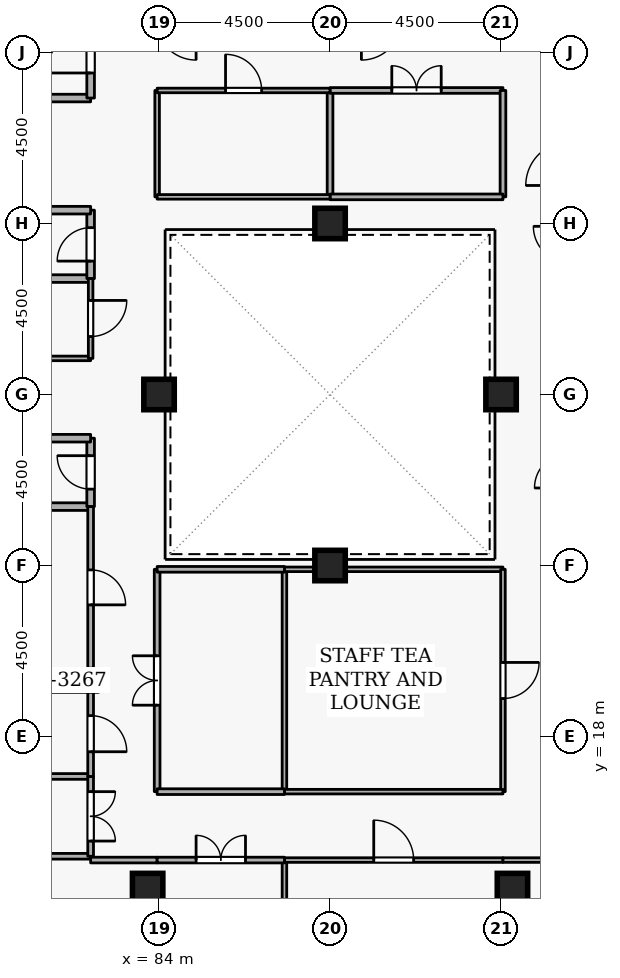
"""IFC4 building model, lengths in metres.
Left out: names, types, materials, properties, quantities, classifications, styles, units other than length and angle.
Written with IfcOpenShell. Run it as: python <this file> out.ifc"""

import sys

from ifc_helpers import new_model, si_unit, direction, frame, frame_2d, origin, origin_2d, place, context, subcontext, project, spatial, rectangle, extrude, element, fill, save


model = new_model("IFC4")
c1 = context("Model", 3, precision=1e-05, world=origin(), true_north=direction((0.0, 1.0)))
c2 = subcontext(c1, "Body", "Model", "MODEL_VIEW")
j1 = project(units=[si_unit("LENGTHUNIT", "METRE"), si_unit("PLANEANGLEUNIT", "RADIAN")], contexts=[c1])
p1 = place(None, origin())
s1 = spatial("IfcSite", under=j1, at=p1, CompositionType="ELEMENT")
p2 = place(p1, origin())
s2 = spatial("IfcBuilding", under=s1, at=p2, CompositionType="ELEMENT")
p3 = place(p2, frame((0.0, 0.0, 265.5)))
s3 = spatial("IfcBuildingStorey", under=s2, at=p3, CompositionType="ELEMENT", Elevation=265.5)
p4 = place(p3, frame((76.6, 19.45, 0.0), z_axis=(0.0, 0.0, 1.0), x_axis=(1.0, 0.0, 0.0)))
e1 = element("IfcWall", 1, at=p4, inside=s3, PredefinedType="SHEAR", context=c2, shape_type="SweptSolid", body=[
    extrude(rectangle(XDim=5.8, YDim=0.5, at=frame_2d((2.9, 0.0))), origin(), (0.0, 0.0, 1.0), 3.6),
])
for number, where, z_axis, x_axis in (
    (2, (93.3, 14.0, 0.0), (0.0, 0.0, 1.0), (1.0, 0.0, 0.0)),
    (3, (83.7, 14.0, 0.0), (0.0, 0.0, 1.0), (1.0, 0.0, 0.0)),
    (4, (93.0, 27.0, 0.0), (0.0, 0.0, 1.0), (1.0, 0.0, 0.0)),
    (5, (84.0, 27.0, 0.0), (0.0, 0.0, 1.0), (1.0, 0.0, 0.0)),
    (6, (88.5, 22.5, 0.0), (0.0, 0.0, 1.0), (1.0, 0.0, 0.0)),
    (7, (88.5, 31.5, 0.0), (0.0, 0.0, 1.0), (1.0, 0.0, 0.0)),
):
    element("IfcColumn", number, at=place(p3, frame(where, z_axis=z_axis, x_axis=x_axis)), inside=s3, PredefinedType="COLUMN", context=c2, shape_type="SweptSolid", body=[
        extrude(rectangle(XDim=0.8, YDim=0.8, at=origin_2d()), origin(), (0.0, 0.0, 1.0), 3.6),
    ])
p5 = place(p3, frame((79.9, 34.8, 0.0), z_axis=(0.0, 0.0, 1.0), x_axis=(1.0, 0.0, 0.0)))
e8 = element("IfcWall", 8, at=p5, inside=s3, PredefinedType="STANDARD", context=c2, shape_type="SweptSolid", body=[
    extrude(rectangle(XDim=2.3, YDim=0.2, at=frame_2d((1.15, 0.0))), origin(), (0.0, 0.0, 1.0), 2.545),
])
p6 = place(p3, frame((82.2, 34.8, 0.0), z_axis=(0.0, 0.0, 1.0), x_axis=(0.0, 1.0, 0.0)))
e9 = element("IfcWall", 9, at=p6, inside=s3, PredefinedType="STANDARD", context=c2, shape_type="SweptSolid", body=[
    extrude(rectangle(XDim=2.5, YDim=0.2, at=frame_2d((1.25, 0.0))), origin(), (0.0, 0.0, 1.0), 3.34),
])
p7 = place(p6, frame((0.66, 0.0, 0.0)))
e10 = element("IfcOpeningElement", 10, at=p7, cuts=e9, PredefinedType="OPENING", context=c2, shape_type="SweptSolid", body=[
    extrude(rectangle(XDim=1.15, YDim=2.1, at=frame_2d((0.575, 1.05))), frame((0.0, 0.11, 0.0), z_axis=(0.0, -1.0, 0.0), x_axis=(1.0, 0.0, 0.0)), (0.0, 0.0, 1.0), 0.22),
])
p8 = place(p3, frame((80.15, 24.05, 0.0), z_axis=(0.0, 0.0, 1.0), x_axis=(1.0, 0.0, 0.0)))
e11 = element("IfcWall", 11, at=p8, inside=s3, PredefinedType="STANDARD", context=c2, shape_type="SweptSolid", body=[
    extrude(rectangle(XDim=2.05, YDim=0.2, at=frame_2d((1.025, 0.0))), origin(), (0.0, 0.0, 1.0), 3.34),
])
p9 = place(p3, frame((82.2, 24.05, 0.0), z_axis=(0.0, 0.0, 1.0), x_axis=(0.0, 1.0, 0.0)))
e12 = element("IfcWall", 12, at=p9, inside=s3, PredefinedType="STANDARD", context=c2, shape_type="SweptSolid", body=[
    extrude(rectangle(XDim=1.8, YDim=0.2, at=frame_2d((0.9, 0.0))), origin(), (0.0, 0.0, 1.0), 3.34),
])
p10 = place(p9, frame((0.46, 0.0, 0.0)))
e13 = element("IfcOpeningElement", 13, at=p10, cuts=e12, PredefinedType="OPENING", context=c2, shape_type="SweptSolid", body=[
    extrude(rectangle(XDim=0.88, YDim=2.04, at=frame_2d((0.44, 1.02))), frame((0.0, 0.11, 0.0), z_axis=(0.0, -1.0, 0.0), x_axis=(1.0, 0.0, 0.0)), (0.0, 0.0, 1.0), 0.22),
])
for number, where, z_axis, x_axis in (
    (14, (82.2, 25.85, 0.0), (0.0, 0.0, 1.0), (-1.0, 0.0, 0.0)),
    (15, (80.15, 30.05, 0.0), (0.0, 0.0, 1.0), (1.0, 0.0, 0.0)),
):
    element("IfcWall", number, at=place(p3, frame(where, z_axis=z_axis, x_axis=x_axis)), inside=s3, PredefinedType="STANDARD", context=c2, shape_type="SweptSolid", body=[
        extrude(rectangle(XDim=2.05, YDim=0.2, at=frame_2d((1.025, 0.0))), origin(), (0.0, 0.0, 1.0), 3.34),
    ])
p11 = place(p3, frame((82.2, 30.05, 0.0), z_axis=(0.0, 0.0, 1.0), x_axis=(0.0, 1.0, 0.0)))
e16 = element("IfcWall", 16, at=p11, inside=s3, PredefinedType="STANDARD", context=c2, shape_type="SweptSolid", body=[
    extrude(rectangle(XDim=1.8, YDim=0.2, at=frame_2d((0.9, 0.0))), origin(), (0.0, 0.0, 1.0), 3.34),
])
p12 = place(p11, frame((0.46, 0.0, 0.0)))
e17 = element("IfcOpeningElement", 17, at=p12, cuts=e16, PredefinedType="OPENING", context=c2, shape_type="SweptSolid", body=[
    extrude(rectangle(XDim=0.88, YDim=2.04, at=frame_2d((0.44, 1.02))), frame((0.0, 0.11, 0.0), z_axis=(0.0, -1.0, 0.0), x_axis=(1.0, 0.0, 0.0)), (0.0, 0.0, 1.0), 0.22),
])
p13 = place(p3, frame((82.2, 31.85, 0.0), z_axis=(0.0, 0.0, 1.0), x_axis=(-1.0, 0.0, 0.0)))
e18 = element("IfcWall", 18, at=p13, inside=s3, PredefinedType="STANDARD", context=c2, shape_type="SweptSolid", body=[
    extrude(rectangle(XDim=2.05, YDim=0.2, at=frame_2d((1.025, 0.0))), origin(), (0.0, 0.0, 1.0), 3.34),
])
p14 = place(p3, frame((82.2, 24.05, 0.0), z_axis=(0.0, 0.0, 1.0), x_axis=(0.0, -1.0, 0.0)))
e19 = element("IfcWall", 19, at=p14, inside=s3, PredefinedType="PARTITIONING", context=c2, shape_type="SweptSolid", body=[
    extrude(rectangle(XDim=4.25, YDim=0.15, at=frame_2d((2.125, 0.0))), origin(), (0.0, 0.0, 1.0), 3.34),
])
p15 = place(p14, frame((1.665, 0.0, 0.0)))
e20 = element("IfcOpeningElement", 20, at=p15, cuts=e19, PredefinedType="OPENING", context=c2, shape_type="SweptSolid", body=[
    extrude(rectangle(XDim=0.92, YDim=2.08, at=frame_2d((0.46, 1.04))), frame((0.0, 0.085, 0.0), z_axis=(0.0, -1.0, 0.0), x_axis=(1.0, 0.0, 0.0)), (0.0, 0.0, 1.0), 0.17),
])
p16 = place(p3, frame((82.2, 27.95, 0.0), z_axis=(0.0, 0.0, 1.0), x_axis=(-1.0, 0.0, 0.0)))
e21 = element("IfcWall", 21, at=p16, inside=s3, PredefinedType="PARTITIONING", context=c2, shape_type="SweptSolid", body=[
    extrude(rectangle(XDim=2.05, YDim=0.12, at=frame_2d((1.025, 0.0))), origin(), (0.0, 0.0, 1.0), 3.34),
])
p17 = place(p3, frame((82.2, 30.05, 0.0), z_axis=(0.0, 0.0, 1.0), x_axis=(0.0, -1.0, 0.0)))
e22 = element("IfcWall", 22, at=p17, inside=s3, PredefinedType="PARTITIONING", context=c2, shape_type="SweptSolid", body=[
    extrude(rectangle(XDim=2.1, YDim=0.12, at=frame_2d((1.05, 0.0))), origin(), (0.0, 0.0, 1.0), 3.34),
])
p18 = place(p17, frame((0.575, 0.0, 0.0)))
e23 = element("IfcOpeningElement", 23, at=p18, cuts=e22, PredefinedType="OPENING", context=c2, shape_type="SweptSolid", body=[
    extrude(rectangle(XDim=0.95, YDim=2.1, at=frame_2d((0.475, 1.05))), frame((0.0, 0.07, 0.0), z_axis=(0.0, -1.0, 0.0), x_axis=(1.0, 0.0, 0.0)), (0.0, 0.0, 1.0), 0.14),
])
for number, where, z_axis, x_axis in (
    (24, (82.2, 14.85, 0.0), (0.0, 0.0, 1.0), (-1.0, 0.0, 0.0)),
    (25, (70.78, 16.95, 0.0), (0.0, 0.0, 1.0), (1.0, 0.0, 0.0)),
):
    element("IfcWall", number, at=place(p3, frame(where, z_axis=z_axis, x_axis=x_axis)), inside=s3, PredefinedType="PARTITIONING", context=c2, shape_type="SweptSolid", body=[
        extrude(rectangle(XDim=11.42, YDim=0.15, at=frame_2d((5.71, 0.0))), origin(), (0.0, 0.0, 1.0), 3.34),
    ])
p19 = place(p3, frame((82.2, 16.95, 0.0), z_axis=(0.0, 0.0, 1.0), x_axis=(0.0, -1.0, 0.0)))
e26 = element("IfcWall", 26, at=p19, inside=s3, PredefinedType="PARTITIONING", context=c2, shape_type="SweptSolid", body=[
    extrude(rectangle(XDim=2.1, YDim=0.15, at=frame_2d((1.05, 0.0))), origin(), (0.0, 0.0, 1.0), 3.34),
])
p20 = place(p19, frame((0.4, 0.0, 0.0)))
e27 = element("IfcOpeningElement", 27, at=p20, cuts=e26, PredefinedType="OPENING", context=c2, shape_type="SweptSolid", body=[
    extrude(rectangle(XDim=1.3, YDim=2.12, at=frame_2d((0.65, 1.06))), frame((0.0, 0.085, 0.0), z_axis=(0.0, -1.0, 0.0), x_axis=(1.0, 0.0, 0.0)), (0.0, 0.0, 1.0), 0.17),
])
p21 = place(p3, frame((82.2, 19.2, 0.0), z_axis=(0.0, 0.0, 1.0), x_axis=(0.0, -1.0, 0.0)))
e28 = element("IfcWall", 28, at=p21, inside=s3, PredefinedType="PARTITIONING", context=c2, shape_type="SweptSolid", body=[
    extrude(rectangle(XDim=2.25, YDim=0.15, at=frame_2d((1.125, 0.0))), origin(), (0.0, 0.0, 1.0), 3.34),
])
p22 = place(p21, frame((0.65, 0.0, 0.0)))
e29 = element("IfcOpeningElement", 29, at=p22, cuts=e28, PredefinedType="OPENING", context=c2, shape_type="SweptSolid", body=[
    extrude(rectangle(XDim=0.95, YDim=2.1, at=frame_2d((0.475, 1.05))), frame((0.0, 0.085, 0.0), z_axis=(0.0, -1.0, 0.0), x_axis=(1.0, 0.0, 0.0)), (0.0, 0.0, 1.0), 0.17),
])
p23 = place(p3, frame((87.3, 9.28, 0.0), z_axis=(0.0, 0.0, 1.0), x_axis=(0.0, 1.0, 0.0)))
e30 = element("IfcWall", 30, at=p23, inside=s3, PredefinedType="PARTITIONING", context=c2, shape_type="SweptSolid", body=[
    extrude(rectangle(XDim=5.47, YDim=0.12, at=frame_2d((2.735, 0.0))), origin(), (0.0, 0.0, 1.0), 3.34),
])
p24 = place(p3, frame((87.3, 14.75, 0.0), z_axis=(0.0, 0.0, 1.0), x_axis=(1.0, 0.0, 0.0)))
e31 = element("IfcWall", 31, at=p24, inside=s3, PredefinedType="PARTITIONING", context=c2, shape_type="SweptSolid", body=[
    extrude(rectangle(XDim=5.75, YDim=0.12, at=frame_2d((2.875, 0.0))), origin(), (0.0, 0.0, 1.0), 3.34),
])
p25 = place(p24, frame((2.35, 0.0, 0.0)))
e32 = element("IfcOpeningElement", 32, at=p25, cuts=e31, PredefinedType="OPENING", context=c2, shape_type="SweptSolid", body=[
    extrude(rectangle(XDim=1.05, YDim=2.1, at=frame_2d((0.525, 1.05))), frame((0.0, 0.07, 0.0), z_axis=(0.0, -1.0, 0.0), x_axis=(1.0, 0.0, 0.0)), (0.0, 0.0, 1.0), 0.14),
])
p26 = place(p3, frame((93.05, 14.75, 0.0), z_axis=(0.0, 0.0, 1.0), x_axis=(1.0, 0.0, 0.0)))
e33 = element("IfcWall", 33, at=p26, inside=s3, PredefinedType="PARTITIONING", context=c2, shape_type="SweptSolid", body=[
    extrude(rectangle(XDim=1.75, YDim=0.12, at=frame_2d((0.875, 0.0))), origin(), (0.0, 0.0, 1.0), 3.34),
])
p27 = place(p3, frame((82.2, 14.75, 0.0), z_axis=(0.0, 0.0, 1.0), x_axis=(1.0, 0.0, 0.0)))
e34 = element("IfcWall", 34, at=p27, inside=s3, PredefinedType="PARTITIONING", context=c2, shape_type="SweptSolid", body=[
    extrude(rectangle(XDim=1.75, YDim=0.15, at=frame_2d((0.875, 0.0))), origin(), (0.0, 0.0, 1.0), 3.34),
])
p28 = place(p3, frame((83.95, 14.75, 0.0), z_axis=(0.0, 0.0, 1.0), x_axis=(1.0, 0.0, 0.0)))
e35 = element("IfcWall", 35, at=p28, inside=s3, PredefinedType="PARTITIONING", context=c2, shape_type="SweptSolid", body=[
    extrude(rectangle(XDim=3.35, YDim=0.15, at=frame_2d((1.675, 0.0))), origin(), (0.0, 0.0, 1.0), 3.34),
])
p29 = place(p28, frame((1.025, 0.0, 0.0)))
e36 = element("IfcOpeningElement", 36, at=p29, cuts=e35, PredefinedType="OPENING", context=c2, shape_type="SweptSolid", body=[
    extrude(rectangle(XDim=1.3, YDim=2.12, at=frame_2d((0.65, 1.06))), frame((0.0, 0.085, 0.0), z_axis=(0.0, -1.0, 0.0), x_axis=(1.0, 0.0, 0.0)), (0.0, 0.0, 1.0), 0.17),
])
p30 = place(p3, frame((87.3, 16.55, 0.0), z_axis=(0.0, 0.0, 1.0), x_axis=(0.0, 1.0, 0.0)))
e37 = element("IfcWall", 37, at=p30, inside=s3, PredefinedType="PARTITIONING", context=c2, shape_type="SweptSolid", body=[
    extrude(rectangle(XDim=5.85, YDim=0.12, at=frame_2d((2.925, 0.0))), origin(), (0.0, 0.0, 1.0), 3.34),
])
p31 = place(p3, frame((87.3, 22.4, 0.0), z_axis=(0.0, 0.0, 1.0), x_axis=(1.0, 0.0, 0.0)))
e38 = element("IfcWall", 38, at=p31, inside=s3, PredefinedType="PARTITIONING", context=c2, shape_type="SweptSolid", body=[
    extrude(rectangle(XDim=5.75, YDim=0.12, at=frame_2d((2.875, 0.0))), origin(), (0.0, 0.0, 1.0), 3.34),
])
p32 = place(p3, frame((93.05, 22.4, 0.0), z_axis=(0.0, 0.0, 1.0), x_axis=(0.0, -1.0, 0.0)))
e39 = element("IfcWall", 39, at=p32, inside=s3, PredefinedType="PARTITIONING", context=c2, shape_type="SweptSolid", body=[
    extrude(rectangle(XDim=5.85, YDim=0.12, at=frame_2d((2.925, 0.0))), origin(), (0.0, 0.0, 1.0), 3.34),
])
p33 = place(p32, frame((2.45, 0.0, 0.0)))
e40 = element("IfcOpeningElement", 40, at=p33, cuts=e39, PredefinedType="OPENING", context=c2, shape_type="SweptSolid", body=[
    extrude(rectangle(XDim=0.95, YDim=2.1, at=frame_2d((0.475, 1.05))), frame((0.0, 0.07, 0.0), z_axis=(0.0, -1.0, 0.0), x_axis=(1.0, 0.0, 0.0)), (0.0, 0.0, 1.0), 0.14),
])
p34 = place(p3, frame((93.05, 16.55, 0.0), z_axis=(0.0, 0.0, 1.0), x_axis=(-1.0, 0.0, 0.0)))
e41 = element("IfcWall", 41, at=p34, inside=s3, PredefinedType="PARTITIONING", context=c2, shape_type="SweptSolid", body=[
    extrude(rectangle(XDim=5.75, YDim=0.12, at=frame_2d((2.875, 0.0))), origin(), (0.0, 0.0, 1.0), 3.34),
])
p35 = place(p3, frame((83.95, 16.55, 0.0), z_axis=(0.0, 0.0, 1.0), x_axis=(0.0, 1.0, 0.0)))
e42 = element("IfcWall", 42, at=p35, inside=s3, PredefinedType="PARTITIONING", context=c2, shape_type="SweptSolid", body=[
    extrude(rectangle(XDim=5.85, YDim=0.15, at=frame_2d((2.925, 0.0))), origin(), (0.0, 0.0, 1.0), 3.34),
])
p36 = place(p35, frame((2.275, 0.0, 0.0)))
e43 = element("IfcOpeningElement", 43, at=p36, cuts=e42, PredefinedType="OPENING", context=c2, shape_type="SweptSolid", body=[
    extrude(rectangle(XDim=1.3, YDim=2.12, at=frame_2d((0.65, 1.06))), frame((0.0, 0.085, 0.0), z_axis=(0.0, -1.0, 0.0), x_axis=(1.0, 0.0, 0.0)), (0.0, 0.0, 1.0), 0.17),
])
for number, where, z_axis, x_axis in (
    (44, (83.95, 22.4, 0.0), (0.0, 0.0, 1.0), (1.0, 0.0, 0.0)),
    (45, (87.3, 16.55, 0.0), (0.0, 0.0, 1.0), (-1.0, 0.0, 0.0)),
):
    element("IfcWall", number, at=place(p3, frame(where, z_axis=z_axis, x_axis=x_axis)), inside=s3, PredefinedType="PARTITIONING", context=c2, shape_type="SweptSolid", body=[
        extrude(rectangle(XDim=3.35, YDim=0.15, at=frame_2d((1.675, 0.0))), origin(), (0.0, 0.0, 1.0), 3.34),
    ])
p37 = place(p3, frame((88.5, 32.2, 0.0), z_axis=(0.0, 0.0, 1.0), x_axis=(0.0, 1.0, 0.0)))
e46 = element("IfcWall", 46, at=p37, inside=s3, PredefinedType="PARTITIONING", context=c2, shape_type="SweptSolid", body=[
    extrude(rectangle(XDim=2.8, YDim=0.15, at=frame_2d((1.4, 0.0))), origin(), (0.0, 0.0, 1.0), 3.34),
])
p38 = place(p3, frame((88.5, 35.0, 0.0), z_axis=(0.0, 0.0, 1.0), x_axis=(1.0, 0.0, 0.0)))
e47 = element("IfcWall", 47, at=p38, inside=s3, PredefinedType="PARTITIONING", context=c2, shape_type="SweptSolid", body=[
    extrude(rectangle(XDim=4.55, YDim=0.15, at=frame_2d((2.275, 0.0))), origin(), (0.0, 0.0, 1.0), 3.34),
])
p39 = place(p38, frame((1.625, 0.0, 0.0)))
e48 = element("IfcOpeningElement", 48, at=p39, cuts=e47, PredefinedType="OPENING", context=c2, shape_type="SweptSolid", body=[
    extrude(rectangle(XDim=1.3, YDim=2.12, at=frame_2d((0.65, 1.06))), frame((0.0, 0.085, 0.0), z_axis=(0.0, -1.0, 0.0), x_axis=(1.0, 0.0, 0.0)), (0.0, 0.0, 1.0), 0.17),
])
p40 = place(p3, frame((93.05, 35.0, 0.0), z_axis=(0.0, 0.0, 1.0), x_axis=(0.0, -1.0, 0.0)))
e49 = element("IfcWall", 49, at=p40, inside=s3, PredefinedType="PARTITIONING", context=c2, shape_type="SweptSolid", body=[
    extrude(rectangle(XDim=2.8, YDim=0.15, at=frame_2d((1.4, 0.0))), origin(), (0.0, 0.0, 1.0), 3.34),
])
p41 = place(p3, frame((93.05, 32.2, 0.0), z_axis=(0.0, 0.0, 1.0), x_axis=(-1.0, 0.0, 0.0)))
e50 = element("IfcWall", 50, at=p41, inside=s3, PredefinedType="PARTITIONING", context=c2, shape_type="SweptSolid", body=[
    extrude(rectangle(XDim=4.55, YDim=0.15, at=frame_2d((2.275, 0.0))), origin(), (0.0, 0.0, 1.0), 3.34),
])
p42 = place(p3, frame((83.95, 32.2, 0.0), z_axis=(0.0, 0.0, 1.0), x_axis=(0.0, 1.0, 0.0)))
e51 = element("IfcWall", 51, at=p42, inside=s3, PredefinedType="PARTITIONING", context=c2, shape_type="SweptSolid", body=[
    extrude(rectangle(XDim=2.8, YDim=0.12, at=frame_2d((1.4, 0.0))), origin(), (0.0, 0.0, 1.0), 3.34),
])
p43 = place(p3, frame((83.95, 35.0, 0.0), z_axis=(0.0, 0.0, 1.0), x_axis=(1.0, 0.0, 0.0)))
e52 = element("IfcWall", 52, at=p43, inside=s3, PredefinedType="PARTITIONING", context=c2, shape_type="SweptSolid", body=[
    extrude(rectangle(XDim=4.55, YDim=0.12, at=frame_2d((2.275, 0.0))), origin(), (0.0, 0.0, 1.0), 3.34),
])
p44 = place(p43, frame((1.8, 0.0, 0.0)))
e53 = element("IfcOpeningElement", 53, at=p44, cuts=e52, PredefinedType="OPENING", context=c2, shape_type="SweptSolid", body=[
    extrude(rectangle(XDim=0.95, YDim=2.1, at=frame_2d((0.475, 1.05))), frame((0.0, 0.07, 0.0), z_axis=(0.0, -1.0, 0.0), x_axis=(1.0, 0.0, 0.0)), (0.0, 0.0, 1.0), 0.14),
])
p45 = place(p3, frame((88.5, 32.2, 0.0), z_axis=(0.0, 0.0, 1.0), x_axis=(-1.0, 0.0, 0.0)))
e54 = element("IfcWall", 54, at=p45, inside=s3, PredefinedType="PARTITIONING", context=c2, shape_type="SweptSolid", body=[
    extrude(rectangle(XDim=4.55, YDim=0.12, at=frame_2d((2.275, 0.0))), origin(), (0.0, 0.0, 1.0), 3.34),
])
p46 = place(p7, origin())
e55 = element("IfcDoor", 55, at=p46, inside=s3, OperationType="SINGLE_SWING_LEFT", PredefinedType="DOOR", context=c2, shape_type="SweptSolid", body=[
    extrude(rectangle(XDim=1.15, YDim=2.1, at=frame_2d((0.575, 1.05))), frame((0.0, 0.025, 0.0), z_axis=(0.0, -1.0, 0.0), x_axis=(1.0, 0.0, 0.0)), (0.0, 0.0, 1.0), 0.05),
])
fill(e10, e55)
p47 = place(p10, origin())
e56 = element("IfcDoor", 56, at=p47, inside=s3, OperationType="SINGLE_SWING_RIGHT", PredefinedType="DOOR", context=c2, shape_type="SweptSolid", body=[
    extrude(rectangle(XDim=0.88, YDim=2.04, at=frame_2d((0.44, 1.02))), frame((0.0, 0.025, 0.0), z_axis=(0.0, -1.0, 0.0), x_axis=(1.0, 0.0, 0.0)), (0.0, 0.0, 1.0), 0.05),
])
fill(e13, e56)
p48 = place(p12, origin())
e57 = element("IfcDoor", 57, at=p48, inside=s3, OperationType="SINGLE_SWING_LEFT", PredefinedType="DOOR", context=c2, shape_type="SweptSolid", body=[
    extrude(rectangle(XDim=0.88, YDim=2.04, at=frame_2d((0.44, 1.02))), frame((0.0, 0.025, 0.0), z_axis=(0.0, -1.0, 0.0), x_axis=(1.0, 0.0, 0.0)), (0.0, 0.0, 1.0), 0.05),
])
fill(e17, e57)
p49 = place(p15, origin())
e58 = element("IfcDoor", 58, at=p49, inside=s3, OperationType="SINGLE_SWING_RIGHT", PredefinedType="DOOR", context=c2, shape_type="SweptSolid", body=[
    extrude(rectangle(XDim=0.92, YDim=2.08, at=frame_2d((0.46, 1.04))), frame((0.0, 0.025, 0.0), z_axis=(0.0, -1.0, 0.0), x_axis=(1.0, 0.0, 0.0)), (0.0, 0.0, 1.0), 0.05),
])
fill(e20, e58)
p50 = place(p18, origin())
e59 = element("IfcDoor", 59, at=p50, inside=s3, OperationType="SINGLE_SWING_LEFT", PredefinedType="DOOR", context=c2, shape_type="SweptSolid", body=[
    extrude(rectangle(XDim=0.95, YDim=2.1, at=frame_2d((0.475, 1.05))), frame((0.0, 0.025, 0.0), z_axis=(0.0, -1.0, 0.0), x_axis=(1.0, 0.0, 0.0)), (0.0, 0.0, 1.0), 0.05),
])
fill(e23, e59)
p51 = place(p20, origin())
e60 = element("IfcDoor", 60, at=p51, inside=s3, OperationType="DOUBLE_DOOR_SINGLE_SWING", PredefinedType="DOOR", context=c2, shape_type="SweptSolid", body=[
    extrude(rectangle(XDim=1.3, YDim=2.12, at=frame_2d((0.65, 1.06))), frame((0.0, 0.025, 0.0), z_axis=(0.0, -1.0, 0.0), x_axis=(1.0, 0.0, 0.0)), (0.0, 0.0, 1.0), 0.05),
])
fill(e27, e60)
p52 = place(p22, origin())
e61 = element("IfcDoor", 61, at=p52, inside=s3, OperationType="SINGLE_SWING_RIGHT", PredefinedType="DOOR", context=c2, shape_type="SweptSolid", body=[
    extrude(rectangle(XDim=0.95, YDim=2.1, at=frame_2d((0.475, 1.05))), frame((0.0, 0.025, 0.0), z_axis=(0.0, -1.0, 0.0), x_axis=(1.0, 0.0, 0.0)), (0.0, 0.0, 1.0), 0.05),
])
fill(e29, e61)
p53 = place(p25, origin())
e62 = element("IfcDoor", 62, at=p53, inside=s3, OperationType="SINGLE_SWING_LEFT", PredefinedType="DOOR", context=c2, shape_type="SweptSolid", body=[
    extrude(rectangle(XDim=1.05, YDim=2.1, at=frame_2d((0.525, 1.05))), frame((0.0, 0.025, 0.0), z_axis=(0.0, -1.0, 0.0), x_axis=(1.0, 0.0, 0.0)), (0.0, 0.0, 1.0), 0.05),
])
fill(e32, e62)
p54 = place(p29, origin())
e63 = element("IfcDoor", 63, at=p54, inside=s3, OperationType="DOUBLE_DOOR_SINGLE_SWING", PredefinedType="DOOR", context=c2, shape_type="SweptSolid", body=[
    extrude(rectangle(XDim=1.3, YDim=2.12, at=frame_2d((0.65, 1.06))), frame((0.0, 0.025, 0.0), z_axis=(0.0, -1.0, 0.0), x_axis=(1.0, 0.0, 0.0)), (0.0, 0.0, 1.0), 0.05),
])
fill(e36, e63)
p55 = place(p33, origin())
e64 = element("IfcDoor", 64, at=p55, inside=s3, OperationType="SINGLE_SWING_LEFT", PredefinedType="DOOR", context=c2, shape_type="SweptSolid", body=[
    extrude(rectangle(XDim=0.95, YDim=2.1, at=frame_2d((0.475, 1.05))), frame((0.0, 0.025, 0.0), z_axis=(0.0, -1.0, 0.0), x_axis=(1.0, 0.0, 0.0)), (0.0, 0.0, 1.0), 0.05),
])
fill(e40, e64)
p56 = place(p36, origin())
e65 = element("IfcDoor", 65, at=p56, inside=s3, OperationType="DOUBLE_DOOR_SINGLE_SWING", PredefinedType="DOOR", context=c2, shape_type="SweptSolid", body=[
    extrude(rectangle(XDim=1.3, YDim=2.12, at=frame_2d((0.65, 1.06))), frame((0.0, 0.025, 0.0), z_axis=(0.0, -1.0, 0.0), x_axis=(1.0, 0.0, 0.0)), (0.0, 0.0, 1.0), 0.05),
])
fill(e43, e65)
p57 = place(p39, origin())
e66 = element("IfcDoor", 66, at=p57, inside=s3, OperationType="DOUBLE_DOOR_SINGLE_SWING", PredefinedType="DOOR", context=c2, shape_type="SweptSolid", body=[
    extrude(rectangle(XDim=1.3, YDim=2.12, at=frame_2d((0.65, 1.06))), frame((0.0, 0.025, 0.0), z_axis=(0.0, -1.0, 0.0), x_axis=(1.0, 0.0, 0.0)), (0.0, 0.0, 1.0), 0.05),
])
fill(e48, e66)
p58 = place(p44, origin())
e67 = element("IfcDoor", 67, at=p58, inside=s3, OperationType="SINGLE_SWING_LEFT", PredefinedType="DOOR", context=c2, shape_type="SweptSolid", body=[
    extrude(rectangle(XDim=0.95, YDim=2.1, at=frame_2d((0.475, 1.05))), frame((0.0, 0.025, 0.0), z_axis=(0.0, -1.0, 0.0), x_axis=(1.0, 0.0, 0.0)), (0.0, 0.0, 1.0), 0.05),
])
fill(e53, e67)
save(model, sys.argv[1])
